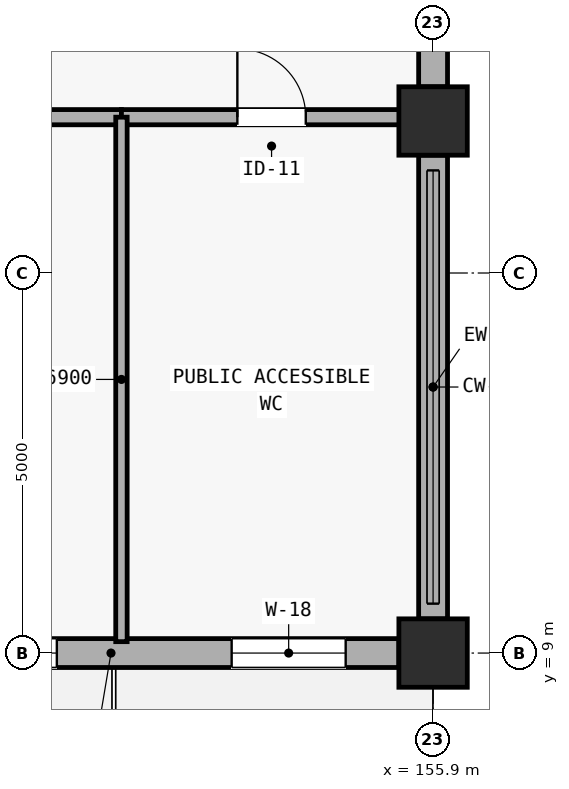
"""IFC4 building model, lengths in metres.
Left out: names, types, materials, properties, quantities, classifications, styles, units other than length and angle.
Written with IfcOpenShell. Run it as: python <this file> out.ifc"""

import sys

from ifc_helpers import new_model, si_unit, direction, frame, frame_2d, origin, origin_2d, place, context, subcontext, project, spatial, rectangle, extrude, element, fill, save


model = new_model("IFC4")
c1 = context("Model", 3, precision=1e-05, world=origin(), true_north=direction((0.0, 1.0)))
c2 = subcontext(c1, "Body", "Model", "MODEL_VIEW")
j1 = project(units=[si_unit("LENGTHUNIT", "METRE"), si_unit("PLANEANGLEUNIT", "RADIAN")], contexts=[c1])
p1 = place(None, origin())
s1 = spatial("IfcSite", under=j1, at=p1, CompositionType="ELEMENT")
p2 = place(p1, origin())
s2 = spatial("IfcBuilding", under=s1, at=p2, CompositionType="ELEMENT")
p3 = place(p2, origin())
s3 = spatial("IfcBuildingStorey", under=s2, at=p3, CompositionType="ELEMENT", Elevation=0.0)
for number, where, z_axis, x_axis in (
    (1, (155.9, 9.0, 0.0), (0.0, 0.0, 1.0), (1.0, 0.0, 0.0)),
    (2, (155.9, 16.0, 0.0), (0.0, 0.0, 1.0), (1.0, 0.0, 0.0)),
):
    element("IfcColumn", number, at=place(p3, frame(where, z_axis=z_axis, x_axis=x_axis)), inside=s3, PredefinedType="COLUMN", context=c2, shape_type="SweptSolid", body=[
        extrude(rectangle(XDim=0.9, YDim=0.9, at=origin_2d()), origin(), (0.0, 0.0, 1.0), 5.85),
    ])
p4 = place(p3, frame((147.875, 9.0, 0.0), z_axis=(0.0, 0.0, 1.0), x_axis=(1.0, 0.0, 0.0)))
e3 = element("IfcWall", 3, at=p4, inside=s3, PredefinedType="STANDARD", context=c2, shape_type="SweptSolid", body=[
    extrude(rectangle(XDim=7.575, YDim=0.38, at=frame_2d((3.788, 0.0))), origin(), (0.0, 0.0, 1.0), 4.75),
])
p5 = place(p4, frame((0.875, 0.0, 0.75)))
e4 = element("IfcOpeningElement", 4, at=p5, cuts=e3, PredefinedType="OPENING", context=c2, shape_type="SweptSolid", body=[
    extrude(rectangle(XDim=2.2, YDim=1.45, at=frame_2d((1.1, 0.725))), frame((0.0, 0.2, 0.0), z_axis=(0.0, -1.0, 0.0), x_axis=(1.0, 0.0, 0.0)), (0.0, 0.0, 1.0), 0.4),
])
p6 = place(p4, frame((5.375, 0.0, 0.75)))
e5 = element("IfcOpeningElement", 5, at=p6, cuts=e3, PredefinedType="OPENING", context=c2, shape_type="SweptSolid", body=[
    extrude(rectangle(XDim=1.5, YDim=1.4, at=frame_2d((0.75, 0.7))), frame((0.0, 0.2, 0.0), z_axis=(0.0, -1.0, 0.0), x_axis=(1.0, 0.0, 0.0)), (0.0, 0.0, 1.0), 0.4),
])
p7 = place(p3, frame((155.9, 9.45, 0.0), z_axis=(0.0, 0.0, 1.0), x_axis=(0.0, 1.0, 0.0)))
e6 = element("IfcWall", 6, at=p7, inside=s3, PredefinedType="STANDARD", context=c2, shape_type="SweptSolid", body=[
    extrude(rectangle(XDim=6.1, YDim=0.38, at=frame_2d((3.05, 0.0))), origin(), (0.0, 0.0, 1.0), 4.75),
])
p8 = place(p3, frame((155.9, 16.45, 0.0), z_axis=(0.0, 0.0, 1.0), x_axis=(0.0, 1.0, 0.0)))
e7 = element("IfcWall", 7, at=p8, inside=s3, PredefinedType="STANDARD", context=c2, shape_type="SweptSolid", body=[
    extrude(rectangle(XDim=7.6, YDim=0.38, at=frame_2d((3.8, 0.0))), origin(), (0.0, 0.0, 1.0), 4.75),
])
p9 = place(p8, frame((0.65, 0.0, 0.0)))
e8 = element("IfcOpeningElement", 8, at=p9, cuts=e7, PredefinedType="OPENING", context=c2, shape_type="SweptSolid", body=[
    extrude(rectangle(XDim=1.75, YDim=2.2, at=frame_2d((0.875, 1.1))), frame((0.0, 0.2, 0.0), z_axis=(0.0, -1.0, 0.0), x_axis=(1.0, 0.0, 0.0)), (0.0, 0.0, 1.0), 0.4),
])
p10 = place(p8, frame((3.8, 0.0, 0.75)))
e9 = element("IfcOpeningElement", 9, at=p10, cuts=e7, PredefinedType="OPENING", context=c2, shape_type="SweptSolid", body=[
    extrude(rectangle(XDim=1.75, YDim=1.55, at=frame_2d((0.875, 0.775))), frame((0.0, 0.2, 0.0), z_axis=(0.0, -1.0, 0.0), x_axis=(1.0, 0.0, 0.0)), (0.0, 0.0, 1.0), 0.4),
])
p11 = place(p3, frame((147.5, 16.05, 0.0), z_axis=(0.0, 0.0, 1.0), x_axis=(1.0, 0.0, 0.0)))
e10 = element("IfcWall", 10, at=p11, inside=s3, PredefinedType="PARTITIONING", context=c2, shape_type="SweptSolid", body=[
    extrude(rectangle(XDim=4.3, YDim=0.2, at=frame_2d((2.15, 0.0))), origin(), (0.0, 0.0, 1.0), 4.19),
])
p12 = place(p3, frame((151.8, 16.05, 0.0), z_axis=(0.0, 0.0, 1.0), x_axis=(1.0, 0.0, 0.0)))
e11 = element("IfcWall", 11, at=p12, inside=s3, PredefinedType="PARTITIONING", context=c2, shape_type="SweptSolid", body=[
    extrude(rectangle(XDim=3.95, YDim=0.2, at=frame_2d((1.975, 0.0))), origin(), (0.0, 0.0, 1.0), 4.19),
])
p13 = place(p12, frame((1.525, 0.0, 0.0)))
e12 = element("IfcOpeningElement", 12, at=p13, cuts=e11, PredefinedType="OPENING", context=c2, shape_type="SweptSolid", body=[
    extrude(rectangle(XDim=0.9, YDim=2.08, at=frame_2d((0.45, 1.04))), frame((0.0, 0.11, 0.0), z_axis=(0.0, -1.0, 0.0), x_axis=(1.0, 0.0, 0.0)), (0.0, 0.0, 1.0), 0.22),
])
p14 = place(p3, frame((151.8, 9.15, 0.0), z_axis=(0.0, 0.0, 1.0), x_axis=(0.0, 1.0, 0.0)))
e13 = element("IfcWall", 13, at=p14, inside=s3, PredefinedType="PARTITIONING", context=c2, shape_type="SweptSolid", body=[
    extrude(rectangle(XDim=6.9, YDim=0.15, at=frame_2d((3.45, 0.0))), origin(), (0.0, 0.0, 1.0), 4.19),
])
p15 = place(p5, origin())
e14 = element("IfcWindow", 14, at=p15, inside=s3, PartitioningType="TRIPLE_PANEL_VERTICAL", PredefinedType="WINDOW", context=c2, shape_type="SweptSolid", body=[
    extrude(rectangle(XDim=2.2, YDim=1.45, at=frame_2d((1.1, 0.725))), frame((0.0, 0.03, 0.0), z_axis=(0.0, -1.0, 0.0), x_axis=(1.0, 0.0, 0.0)), (0.0, 0.0, 1.0), 0.06),
])
fill(e4, e14)
p16 = place(p6, origin())
e15 = element("IfcWindow", 15, at=p16, inside=s3, PartitioningType="DOUBLE_PANEL_VERTICAL", PredefinedType="WINDOW", context=c2, shape_type="SweptSolid", body=[
    extrude(rectangle(XDim=1.5, YDim=1.4, at=frame_2d((0.75, 0.7))), frame((0.0, 0.03, 0.0), z_axis=(0.0, -1.0, 0.0), x_axis=(1.0, 0.0, 0.0)), (0.0, 0.0, 1.0), 0.06),
])
fill(e5, e15)
p17 = place(p13, origin())
e16 = element("IfcDoor", 16, at=p17, inside=s3, OperationType="SINGLE_SWING_LEFT", PredefinedType="DOOR", context=c2, shape_type="SweptSolid", body=[
    extrude(rectangle(XDim=0.9, YDim=2.08, at=frame_2d((0.45, 1.04))), frame((0.0, 0.025, 0.0), z_axis=(0.0, -1.0, 0.0), x_axis=(1.0, 0.0, 0.0)), (0.0, 0.0, 1.0), 0.05),
])
fill(e12, e16)
save(model, sys.argv[1])
